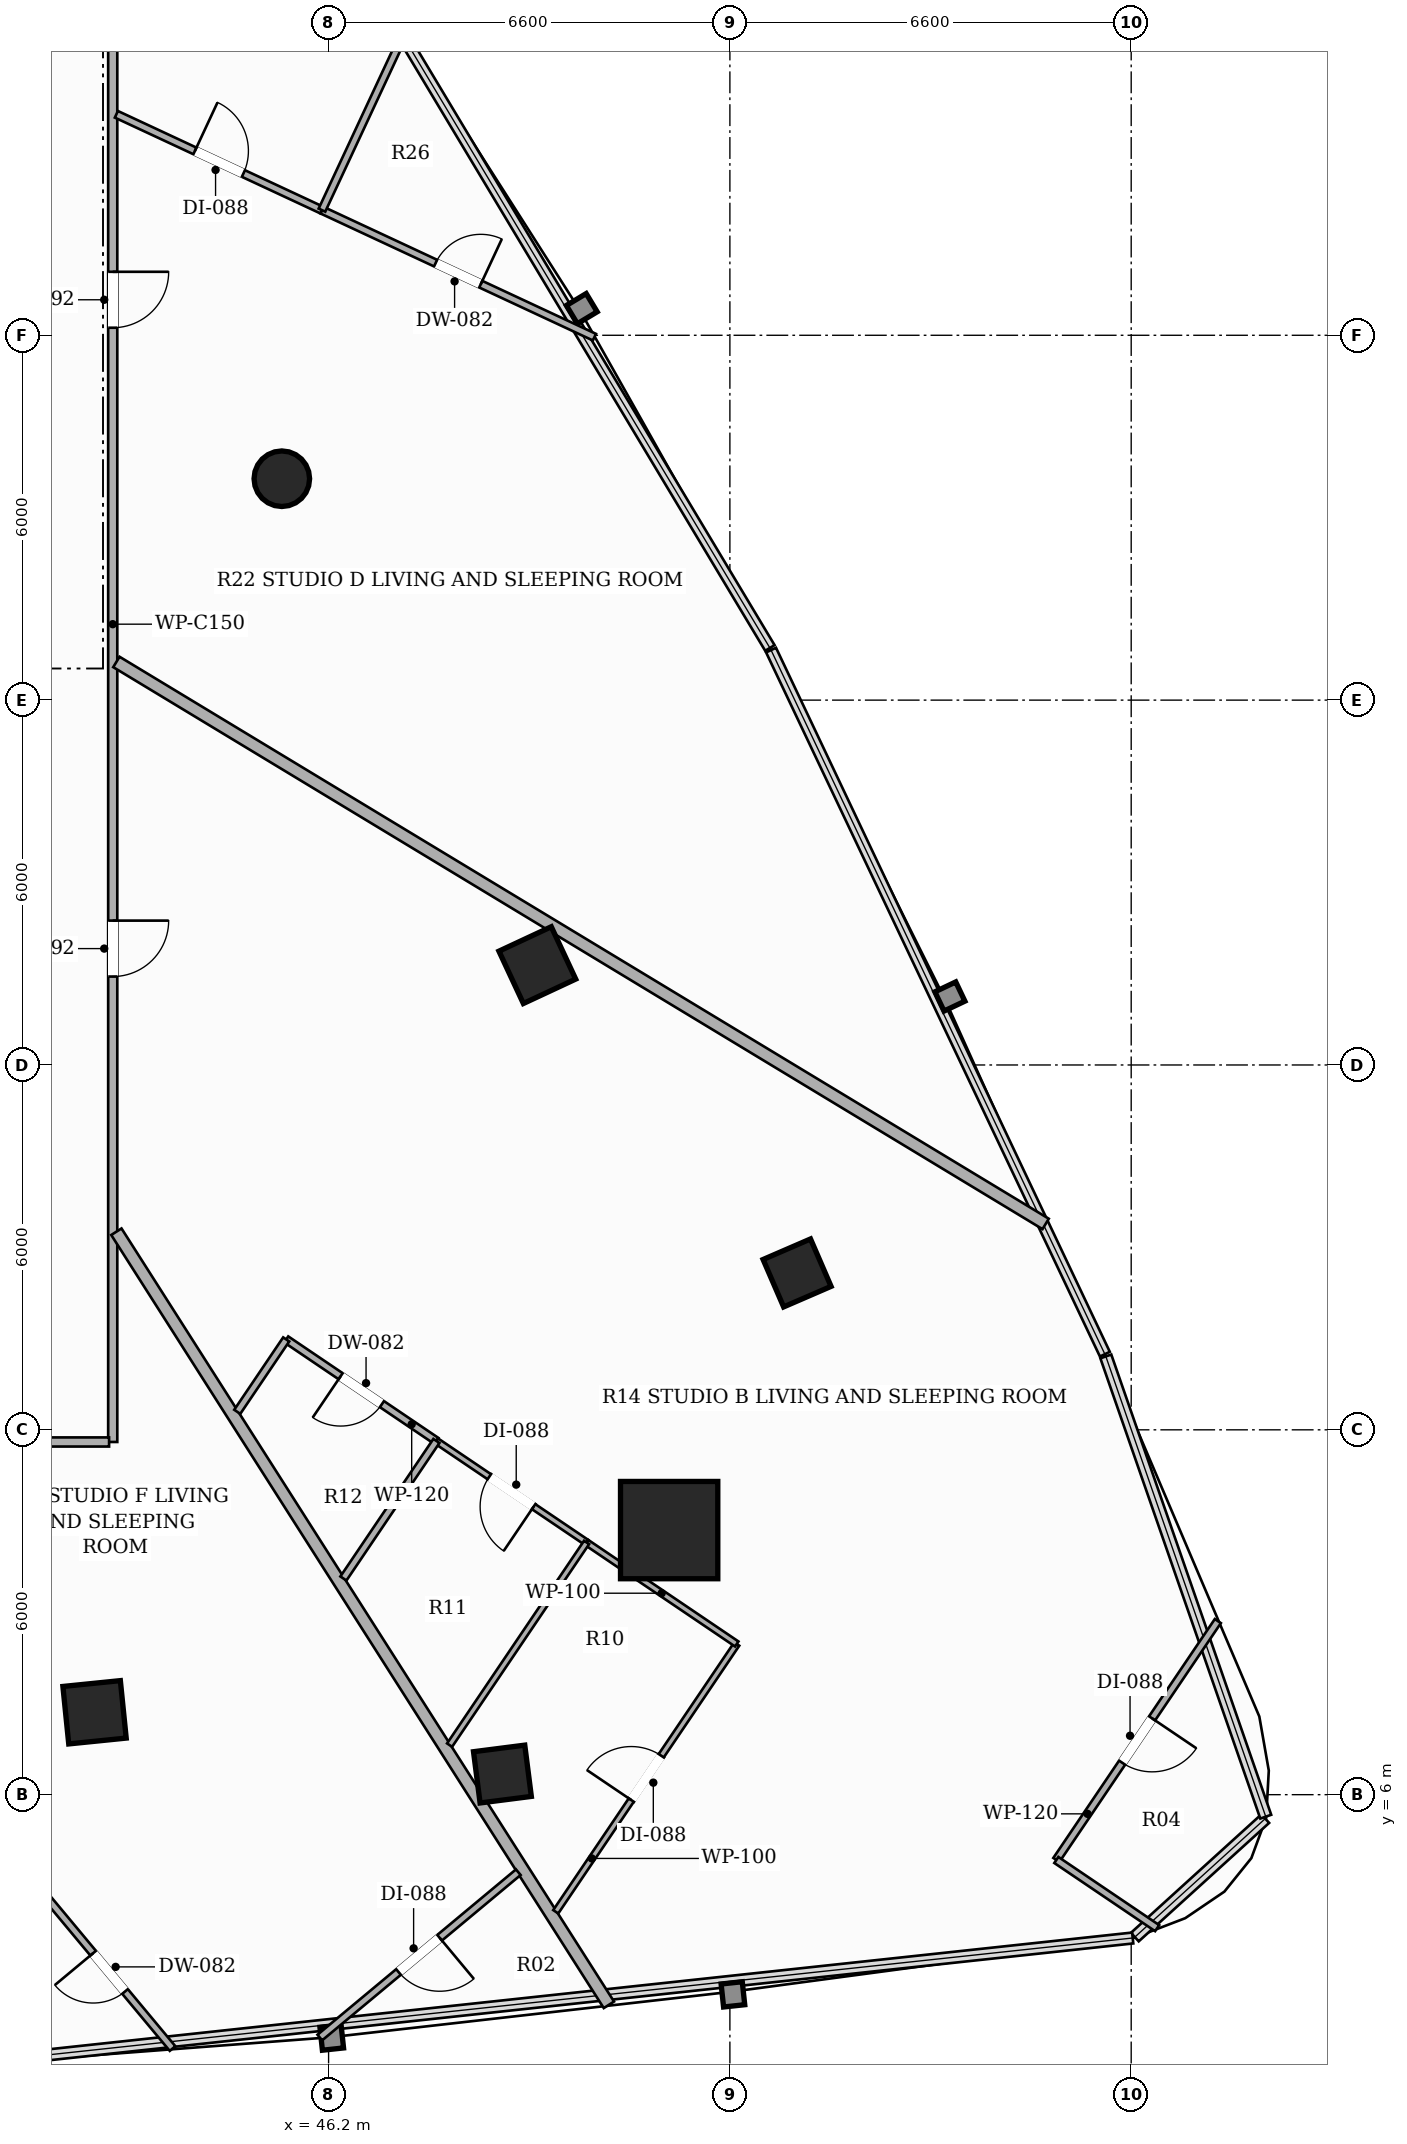
"""IFC4 building model, lengths in metres.
Left out: names, types, materials, properties, quantities, classifications, styles, units other than length and angle.
Written with IfcOpenShell. Run it as: python <this file> out.ifc"""

import sys

from ifc_helpers import new_model, si_unit, direction, frame, frame_2d, origin, origin_2d, place, context, subcontext, project, spatial, rectangle, hollow_rectangle, hollow_circle, extrude, element, fill, save


model = new_model("IFC4")
c1 = context("Model", 3, precision=1e-05, world=origin(), true_north=direction((0.0, 1.0)))
c2 = subcontext(c1, "Body", "Model", "MODEL_VIEW")
j1 = project(units=[si_unit("LENGTHUNIT", "METRE"), si_unit("PLANEANGLEUNIT", "RADIAN")], contexts=[c1])
p1 = place(None, origin())
s1 = spatial("IfcSite", under=j1, at=p1, CompositionType="ELEMENT")
p2 = place(p1, origin())
s2 = spatial("IfcBuilding", under=s1, at=p2, CompositionType="ELEMENT")
p3 = place(p2, frame((0.0, 0.0, 46.7)))
s3 = spatial("IfcBuildingStorey", under=s2, at=p3, CompositionType="ELEMENT", Elevation=46.7)
p4 = place(p3, frame((51.801, 10.351, 0.0), z_axis=(0.0, 0.0, 1.0), x_axis=(1.0, 0.0, 0.0)))
e1 = element("IfcColumn", 1, at=p4, inside=s3, PredefinedType="COLUMN", context=c2, shape_type="SweptSolid", body=[
    extrude(hollow_rectangle(XDim=1.6, YDim=1.6, WallThickness=0.05, at=origin_2d()), origin(), (0.0, 0.0, 1.0), 3.3),
])
for number, where, z_axis, x_axis in (
    (2, (42.351, 7.355, 0.0), (0.0, 0.0, 1.0), (0.995, 0.101, 0.0)),
    (3, (49.633, 19.642, 0.0), (0.0, 0.0, 1.0), (-0.423, 0.906, 0.0)),
):
    element("IfcColumn", number, at=place(p3, frame(where, z_axis=z_axis, x_axis=x_axis)), inside=s3, PredefinedType="COLUMN", context=c2, shape_type="SweptSolid", body=[
        extrude(hollow_rectangle(XDim=0.95, YDim=0.95, WallThickness=0.032, at=origin_2d()), origin(), (0.0, 0.0, 1.0), 3.3),
    ])
p5 = place(p3, frame((45.431, 27.641, 0.0), z_axis=(0.0, 0.0, 1.0), x_axis=(1.0, 0.0, 0.0)))
e4 = element("IfcColumn", 4, at=p5, inside=s3, PredefinedType="COLUMN", context=c2, shape_type="SweptSolid", body=[
    extrude(hollow_circle(Radius=0.457, WallThickness=0.025, at=origin_2d()), origin(), (0.0, 0.0, 1.0), 3.3),
])
for number, where, z_axis, x_axis in (
    (5, (49.059, 6.339, 0.0), (0.0, 0.0, 1.0), (0.992, 0.127, 0.0)),
    (6, (53.905, 14.58, 0.0), (0.0, 0.0, 1.0), (-0.397, 0.918, 0.0)),
):
    element("IfcColumn", number, at=place(p3, frame(where, z_axis=z_axis, x_axis=x_axis)), inside=s3, PredefinedType="COLUMN", context=c2, shape_type="SweptSolid", body=[
        extrude(hollow_rectangle(XDim=0.85, YDim=0.85, WallThickness=0.028, at=origin_2d()), origin(), (0.0, 0.0, 1.0), 3.3),
    ])
p6 = place(p3, frame((42.65, 36.84, 0.0), z_axis=(0.0, 0.0, 1.0), x_axis=(0.0, -1.0, 0.0)))
e7 = element("IfcWall", 7, at=p6, inside=s3, PredefinedType="PARTITIONING", context=c2, shape_type="SweptSolid", body=[
    extrude(rectangle(XDim=25.04, YDim=0.15, at=frame_2d((12.52, 0.0))), origin(), (0.0, 0.0, 1.0), 2.413),
])
p7 = place(p6, frame((16.466, 0.0, 0.0)))
e8 = element("IfcOpeningElement", 8, at=p7, cuts=e7, PredefinedType="OPENING", context=c2, shape_type="SweptSolid", body=[
    extrude(rectangle(XDim=0.92, YDim=2.15, at=frame_2d((0.46, 1.075))), frame((0.0, 0.085, 0.0), z_axis=(0.0, -1.0, 0.0), x_axis=(1.0, 0.0, 0.0)), (0.0, 0.0, 1.0), 0.17),
])
p8 = place(p6, frame((5.796, 0.0, 0.0)))
e9 = element("IfcOpeningElement", 9, at=p8, cuts=e7, PredefinedType="OPENING", context=c2, shape_type="SweptSolid", body=[
    extrude(rectangle(XDim=0.92, YDim=2.15, at=frame_2d((0.46, 1.075))), frame((0.0, 0.085, 0.0), z_axis=(0.0, -1.0, 0.0), x_axis=(1.0, 0.0, 0.0)), (0.0, 0.0, 1.0), 0.17),
])
p9 = place(p3, frame((42.59, 11.8, 0.0), z_axis=(0.0, 0.0, 1.0), x_axis=(-1.0, 0.0, 0.0)))
e10 = element("IfcWall", 10, at=p9, inside=s3, PredefinedType="PARTITIONING", context=c2, shape_type="SweptSolid", body=[
    extrude(rectangle(XDim=19.24, YDim=0.15, at=frame_2d((9.62, 0.0))), origin(), (0.0, 0.0, 1.0), 2.669),
])
p10 = place(p9, frame((10.508, 0.0, 0.0)))
e11 = element("IfcOpeningElement", 11, at=p10, cuts=e10, PredefinedType="OPENING", context=c2, shape_type="SweptSolid", body=[
    extrude(rectangle(XDim=0.88, YDim=2.1, at=frame_2d((0.44, 1.05))), frame((0.0, 0.085, 0.0), z_axis=(0.0, -1.0, 0.0), x_axis=(1.0, 0.0, 0.0)), (0.0, 0.0, 1.0), 0.17),
])
p11 = place(p9, frame((2.98, 0.0, 0.0)))
e12 = element("IfcOpeningElement", 12, at=p11, cuts=e10, PredefinedType="OPENING", context=c2, shape_type="SweptSolid", body=[
    extrude(rectangle(XDim=0.92, YDim=2.15, at=frame_2d((0.46, 1.075))), frame((0.0, 0.085, 0.0), z_axis=(0.0, -1.0, 0.0), x_axis=(1.0, 0.0, 0.0)), (0.0, 0.0, 1.0), 0.17),
])
p12 = place(p3, frame((42.71, 24.628, 0.0), z_axis=(0.0, 0.0, 1.0), x_axis=(0.85570509792, -0.517463801047, 0.0)))
e13 = element("IfcWall", 13, at=p12, inside=s3, PredefinedType="PARTITIONING", context=c2, shape_type="SweptSolid", body=[
    extrude(rectangle(XDim=17.86, YDim=0.2, at=frame_2d((8.93, 0.0))), origin(), (0.0, 0.0, 1.0), 2.413),
])
p13 = place(p3, frame((50.81, 2.544, 0.0), z_axis=(0.0, 0.0, 1.0), x_axis=(-0.537314491885, 0.843381963769, 0.0)))
e14 = element("IfcWall", 14, at=p13, inside=s3, PredefinedType="PARTITIONING", context=c2, shape_type="SweptSolid", body=[
    extrude(rectangle(XDim=15.075, YDim=0.2, at=frame_2d((7.538, 0.0))), origin(), (0.0, 0.0, 1.0), 2.413),
])
p14 = place(p3, frame((47.973, 11.817, 0.0), z_axis=(0.0, 0.0, 1.0), x_axis=(-0.82839181121, 0.560149093653, 0.0)))
e15 = element("IfcWall", 15, at=p14, inside=s3, PredefinedType="PARTITIONING", context=c2, shape_type="SweptSolid", body=[
    extrude(rectangle(XDim=2.982, YDim=0.12, at=frame_2d((1.491, 0.0))), origin(), (0.0, 0.0, 1.0), 2.669),
])
p15 = place(p14, frame((1.081, 0.0, 0.0)))
e16 = element("IfcOpeningElement", 16, at=p15, cuts=e15, PredefinedType="OPENING", context=c2, shape_type="SweptSolid", body=[
    extrude(rectangle(XDim=0.82, YDim=2.1, at=frame_2d((0.41, 1.05))), frame((0.0, 0.07, 0.0), z_axis=(0.0, -1.0, 0.0), x_axis=(1.0, 0.0, 0.0)), (0.0, 0.0, 1.0), 0.14),
])
p16 = place(p3, frame((45.503, 13.487, 0.0), z_axis=(0.0, 0.0, 1.0), x_axis=(-0.559901526605, -0.828559159328, 0.0)))
e17 = element("IfcWall", 17, at=p16, inside=s3, PredefinedType="PARTITIONING", context=c2, shape_type="SweptSolid", body=[
    extrude(rectangle(XDim=1.438, YDim=0.12, at=frame_2d((0.719, 0.0))), origin(), (0.0, 0.0, 1.0), 2.669),
])
p17 = place(p3, frame((60.825, 8.855, 0.0), z_axis=(0.0, 0.0, 1.0), x_axis=(-0.560046533867, -0.828461151716, 0.0)))
e18 = element("IfcWall", 18, at=p17, inside=s3, PredefinedType="PARTITIONING", context=c2, shape_type="SweptSolid", body=[
    extrude(rectangle(XDim=4.742, YDim=0.12, at=frame_2d((2.371, 0.0))), origin(), (0.0, 0.0, 1.0), 3.06),
])
p18 = place(p17, frame((1.931, 0.0, 0.0)))
e19 = element("IfcOpeningElement", 19, at=p18, cuts=e18, PredefinedType="OPENING", context=c2, shape_type="SweptSolid", body=[
    extrude(rectangle(XDim=0.88, YDim=2.1, at=frame_2d((0.44, 1.05))), frame((0.0, 0.07, 0.0), z_axis=(0.0, -1.0, 0.0), x_axis=(1.0, 0.0, 0.0)), (0.0, 0.0, 1.0), 0.14),
])
p19 = place(p3, frame((58.169, 4.926, 0.0), z_axis=(0.0, 0.0, 1.0), x_axis=(0.828391626579, -0.560149366699, 0.0)))
e20 = element("IfcWall", 20, at=p19, inside=s3, PredefinedType="PARTITIONING", context=c2, shape_type="SweptSolid", body=[
    extrude(rectangle(XDim=2.001, YDim=0.12, at=frame_2d((1.001, 0.0))), origin(), (0.0, 0.0, 1.0), 3.06),
])
p20 = place(p3, frame((49.936, 4.074, 0.0), z_axis=(0.0, 0.0, 1.0), x_axis=(0.560030395854, 0.828472060917, 0.0)))
e21 = element("IfcWall", 21, at=p20, inside=s3, PredefinedType="PARTITIONING", context=c2, shape_type="SweptSolid", body=[
    extrude(rectangle(XDim=5.316, YDim=0.1, at=frame_2d((2.658, 0.0))), origin(), (0.0, 0.0, 1.0), 3.06),
])
p21 = place(p20, frame((2.218, 0.0, 0.0)))
e22 = element("IfcOpeningElement", 22, at=p21, cuts=e21, PredefinedType="OPENING", context=c2, shape_type="SweptSolid", body=[
    extrude(rectangle(XDim=0.88, YDim=2.1, at=frame_2d((0.44, 1.05))), frame((0.0, 0.06, 0.0), z_axis=(0.0, -1.0, 0.0), x_axis=(1.0, 0.0, 0.0)), (0.0, 0.0, 1.0), 0.12),
])
p22 = place(p3, frame((52.913, 8.478, 0.0), z_axis=(0.0, 0.0, 1.0), x_axis=(-0.828429805787, 0.560092900226, 0.0)))
e23 = element("IfcWall", 23, at=p22, inside=s3, PredefinedType="PARTITIONING", context=c2, shape_type="SweptSolid", body=[
    extrude(rectangle(XDim=2.981, YDim=0.1, at=frame_2d((1.491, 0.0))), origin(), (0.0, 0.0, 1.0), 2.413),
])
p23 = place(p3, frame((50.443, 10.148, 0.0), z_axis=(0.0, 0.0, 1.0), x_axis=(-0.828607449923, 0.559830058082, 0.0)))
e24 = element("IfcWall", 24, at=p23, inside=s3, PredefinedType="PARTITIONING", context=c2, shape_type="SweptSolid", body=[
    extrude(rectangle(XDim=2.981, YDim=0.1, at=frame_2d((1.491, 0.0))), origin(), (0.0, 0.0, 1.0), 3.06),
])
p24 = place(p23, frame((1.051, 0.0, 0.0)))
e25 = element("IfcOpeningElement", 25, at=p24, cuts=e24, PredefinedType="OPENING", context=c2, shape_type="SweptSolid", body=[
    extrude(rectangle(XDim=0.88, YDim=2.1, at=frame_2d((0.44, 1.05))), frame((0.0, 0.06, 0.0), z_axis=(0.0, -1.0, 0.0), x_axis=(1.0, 0.0, 0.0)), (0.0, 0.0, 1.0), 0.12),
])
p25 = place(p3, frame((47.973, 11.817, 0.0), z_axis=(0.0, 0.0, 1.0), x_axis=(-0.559971898906, -0.828511600665, 0.0)))
e26 = element("IfcWall", 26, at=p25, inside=s3, PredefinedType="PARTITIONING", context=c2, shape_type="SweptSolid", body=[
    extrude(rectangle(XDim=2.73, YDim=0.12, at=frame_2d((1.365, 0.0))), origin(), (0.0, 0.0, 1.0), 2.669),
])
p26 = place(p3, frame((48.19, 6.815, 0.0), z_axis=(0.0, 0.0, 1.0), x_axis=(0.560052199206, 0.828457321873, 0.0)))
e27 = element("IfcWall", 27, at=p26, inside=s3, PredefinedType="PARTITIONING", context=c2, shape_type="SweptSolid", body=[
    extrude(rectangle(XDim=4.023, YDim=0.1, at=frame_2d((2.012, 0.0))), origin(), (0.0, 0.0, 1.0), 2.413),
])
p27 = place(p3, frame((46.091, 32.058, 0.0), z_axis=(0.0, 0.0, 1.0), x_axis=(0.906338250566, -0.422552926343, 0.0)))
e28 = element("IfcWall", 28, at=p27, inside=s3, PredefinedType="PARTITIONING", context=c2, shape_type="SweptSolid", body=[
    extrude(rectangle(XDim=4.944, YDim=0.12, at=frame_2d((2.472, 0.0))), origin(), (0.0, 0.0, 1.0), 3.06),
])
p28 = place(p27, frame((2.062, 0.0, 0.0)))
e29 = element("IfcOpeningElement", 29, at=p28, cuts=e28, PredefinedType="OPENING", context=c2, shape_type="SweptSolid", body=[
    extrude(rectangle(XDim=0.82, YDim=2.1, at=frame_2d((0.41, 1.05))), frame((0.0, 0.07, 0.0), z_axis=(0.0, -1.0, 0.0), x_axis=(1.0, 0.0, 0.0)), (0.0, 0.0, 1.0), 0.14),
])
p29 = place(p3, frame((42.71, 33.634, 0.0), z_axis=(0.0, 0.0, 1.0), x_axis=(0.906380338854, -0.422462638985, 0.0)))
e30 = element("IfcWall", 30, at=p29, inside=s3, PredefinedType="PARTITIONING", context=c2, shape_type="SweptSolid", body=[
    extrude(rectangle(XDim=3.73, YDim=0.12, at=frame_2d((1.865, 0.0))), origin(), (0.0, 0.0, 1.0), 3.06),
])
p30 = place(p29, frame((1.425, 0.0, 0.0)))
e31 = element("IfcOpeningElement", 31, at=p30, cuts=e30, PredefinedType="OPENING", context=c2, shape_type="SweptSolid", body=[
    extrude(rectangle(XDim=0.88, YDim=2.1, at=frame_2d((0.44, 1.05))), frame((0.0, 0.07, 0.0), z_axis=(0.0, -1.0, 0.0), x_axis=(1.0, 0.0, 0.0)), (0.0, 0.0, 1.0), 0.14),
])
p31 = place(p3, frame((46.091, 32.058, 0.0), z_axis=(0.0, 0.0, 1.0), x_axis=(0.422430644664, 0.906395250677, 0.0)))
e32 = element("IfcWall", 32, at=p31, inside=s3, PredefinedType="PARTITIONING", context=c2, shape_type="SweptSolid", body=[
    extrude(rectangle(XDim=3.174, YDim=0.12, at=frame_2d((1.587, 0.0))), origin(), (0.0, 0.0, 1.0), 3.06),
])
p32 = place(p3, frame((43.634, 1.825, 0.0), z_axis=(0.0, 0.0, 1.0), x_axis=(-0.639911914418, 0.768448268777, 0.0)))
e33 = element("IfcWall", 33, at=p32, inside=s3, PredefinedType="PARTITIONING", context=c2, shape_type="SweptSolid", body=[
    extrude(rectangle(XDim=3.261, YDim=0.12, at=frame_2d((1.631, 0.0))), origin(), (0.0, 0.0, 1.0), 3.06),
])
p33 = place(p32, frame((1.221, 0.0, 0.0)))
e34 = element("IfcOpeningElement", 34, at=p33, cuts=e33, PredefinedType="OPENING", context=c2, shape_type="SweptSolid", body=[
    extrude(rectangle(XDim=0.82, YDim=2.1, at=frame_2d((0.41, 1.05))), frame((0.0, 0.07, 0.0), z_axis=(0.0, -1.0, 0.0), x_axis=(1.0, 0.0, 0.0)), (0.0, 0.0, 1.0), 0.14),
])
p34 = place(p3, frame((49.32, 4.725, 0.0), z_axis=(0.0, 0.0, 1.0), x_axis=(-0.768353158093, -0.640026112317, 0.0)))
e35 = element("IfcWall", 35, at=p34, inside=s3, PredefinedType="PARTITIONING", context=c2, shape_type="SweptSolid", body=[
    extrude(rectangle(XDim=4.248, YDim=0.12, at=frame_2d((2.124, 0.0))), origin(), (0.0, 0.0, 1.0), 3.06),
])
p35 = place(p34, frame((1.684, 0.0, 0.0)))
e36 = element("IfcOpeningElement", 36, at=p35, cuts=e35, PredefinedType="OPENING", context=c2, shape_type="SweptSolid", body=[
    extrude(rectangle(XDim=0.88, YDim=2.1, at=frame_2d((0.44, 1.05))), frame((0.0, 0.07, 0.0), z_axis=(0.0, -1.0, 0.0), x_axis=(1.0, 0.0, 0.0)), (0.0, 0.0, 1.0), 0.14),
])
p36 = place(p7, origin())
e37 = element("IfcDoor", 37, at=p36, inside=s3, OperationType="SINGLE_SWING_LEFT", PredefinedType="DOOR", context=c2, shape_type="SweptSolid", body=[
    extrude(rectangle(XDim=0.92, YDim=2.15, at=frame_2d((0.46, 1.075))), frame((0.0, 0.025, 0.0), z_axis=(0.0, -1.0, 0.0), x_axis=(1.0, 0.0, 0.0)), (0.0, 0.0, 1.0), 0.05),
])
fill(e8, e37)
p37 = place(p15, origin())
e38 = element("IfcDoor", 38, at=p37, inside=s3, OperationType="SINGLE_SWING_RIGHT", PredefinedType="DOOR", context=c2, shape_type="SweptSolid", body=[
    extrude(rectangle(XDim=0.82, YDim=2.1, at=frame_2d((0.41, 1.05))), frame((0.0, 0.025, 0.0), z_axis=(0.0, -1.0, 0.0), x_axis=(1.0, 0.0, 0.0)), (0.0, 0.0, 1.0), 0.05),
])
fill(e16, e38)
p38 = place(p18, origin())
e39 = element("IfcDoor", 39, at=p38, inside=s3, OperationType="SINGLE_SWING_LEFT", PredefinedType="DOOR", context=c2, shape_type="SweptSolid", body=[
    extrude(rectangle(XDim=0.88, YDim=2.1, at=frame_2d((0.44, 1.05))), frame((0.0, 0.025, 0.0), z_axis=(0.0, -1.0, 0.0), x_axis=(1.0, 0.0, 0.0)), (0.0, 0.0, 1.0), 0.05),
])
fill(e19, e39)
p39 = place(p21, origin())
e40 = element("IfcDoor", 40, at=p39, inside=s3, OperationType="SINGLE_SWING_LEFT", PredefinedType="DOOR", context=c2, shape_type="SweptSolid", body=[
    extrude(rectangle(XDim=0.88, YDim=2.1, at=frame_2d((0.44, 1.05))), frame((0.0, 0.025, 0.0), z_axis=(0.0, -1.0, 0.0), x_axis=(1.0, 0.0, 0.0)), (0.0, 0.0, 1.0), 0.05),
])
fill(e22, e40)
p40 = place(p24, origin())
e41 = element("IfcDoor", 41, at=p40, inside=s3, OperationType="SINGLE_SWING_LEFT", PredefinedType="DOOR", context=c2, shape_type="SweptSolid", body=[
    extrude(rectangle(XDim=0.88, YDim=2.1, at=frame_2d((0.44, 1.05))), frame((0.0, 0.025, 0.0), z_axis=(0.0, -1.0, 0.0), x_axis=(1.0, 0.0, 0.0)), (0.0, 0.0, 1.0), 0.05),
])
fill(e25, e41)
p41 = place(p8, origin())
e42 = element("IfcDoor", 42, at=p41, inside=s3, OperationType="SINGLE_SWING_LEFT", PredefinedType="DOOR", context=c2, shape_type="SweptSolid", body=[
    extrude(rectangle(XDim=0.92, YDim=2.15, at=frame_2d((0.46, 1.075))), frame((0.0, 0.025, 0.0), z_axis=(0.0, -1.0, 0.0), x_axis=(1.0, 0.0, 0.0)), (0.0, 0.0, 1.0), 0.05),
])
fill(e9, e42)
p42 = place(p28, origin())
e43 = element("IfcDoor", 43, at=p42, inside=s3, OperationType="SINGLE_SWING_RIGHT", PredefinedType="DOOR", context=c2, shape_type="SweptSolid", body=[
    extrude(rectangle(XDim=0.82, YDim=2.1, at=frame_2d((0.41, 1.05))), frame((0.0, 0.025, 0.0), z_axis=(0.0, -1.0, 0.0), x_axis=(1.0, 0.0, 0.0)), (0.0, 0.0, 1.0), 0.05),
])
fill(e29, e43)
p43 = place(p30, origin())
e44 = element("IfcDoor", 44, at=p43, inside=s3, OperationType="SINGLE_SWING_LEFT", PredefinedType="DOOR", context=c2, shape_type="SweptSolid", body=[
    extrude(rectangle(XDim=0.88, YDim=2.1, at=frame_2d((0.44, 1.05))), frame((0.0, 0.025, 0.0), z_axis=(0.0, -1.0, 0.0), x_axis=(1.0, 0.0, 0.0)), (0.0, 0.0, 1.0), 0.05),
])
fill(e31, e44)
p44 = place(p33, origin())
e45 = element("IfcDoor", 45, at=p44, inside=s3, OperationType="SINGLE_SWING_RIGHT", PredefinedType="DOOR", context=c2, shape_type="SweptSolid", body=[
    extrude(rectangle(XDim=0.82, YDim=2.1, at=frame_2d((0.41, 1.05))), frame((0.0, 0.025, 0.0), z_axis=(0.0, -1.0, 0.0), x_axis=(1.0, 0.0, 0.0)), (0.0, 0.0, 1.0), 0.05),
])
fill(e34, e45)
p45 = place(p35, origin())
e46 = element("IfcDoor", 46, at=p45, inside=s3, OperationType="SINGLE_SWING_LEFT", PredefinedType="DOOR", context=c2, shape_type="SweptSolid", body=[
    extrude(rectangle(XDim=0.88, YDim=2.1, at=frame_2d((0.44, 1.05))), frame((0.0, 0.025, 0.0), z_axis=(0.0, -1.0, 0.0), x_axis=(1.0, 0.0, 0.0)), (0.0, 0.0, 1.0), 0.05),
])
fill(e36, e46)
save(model, sys.argv[1])
